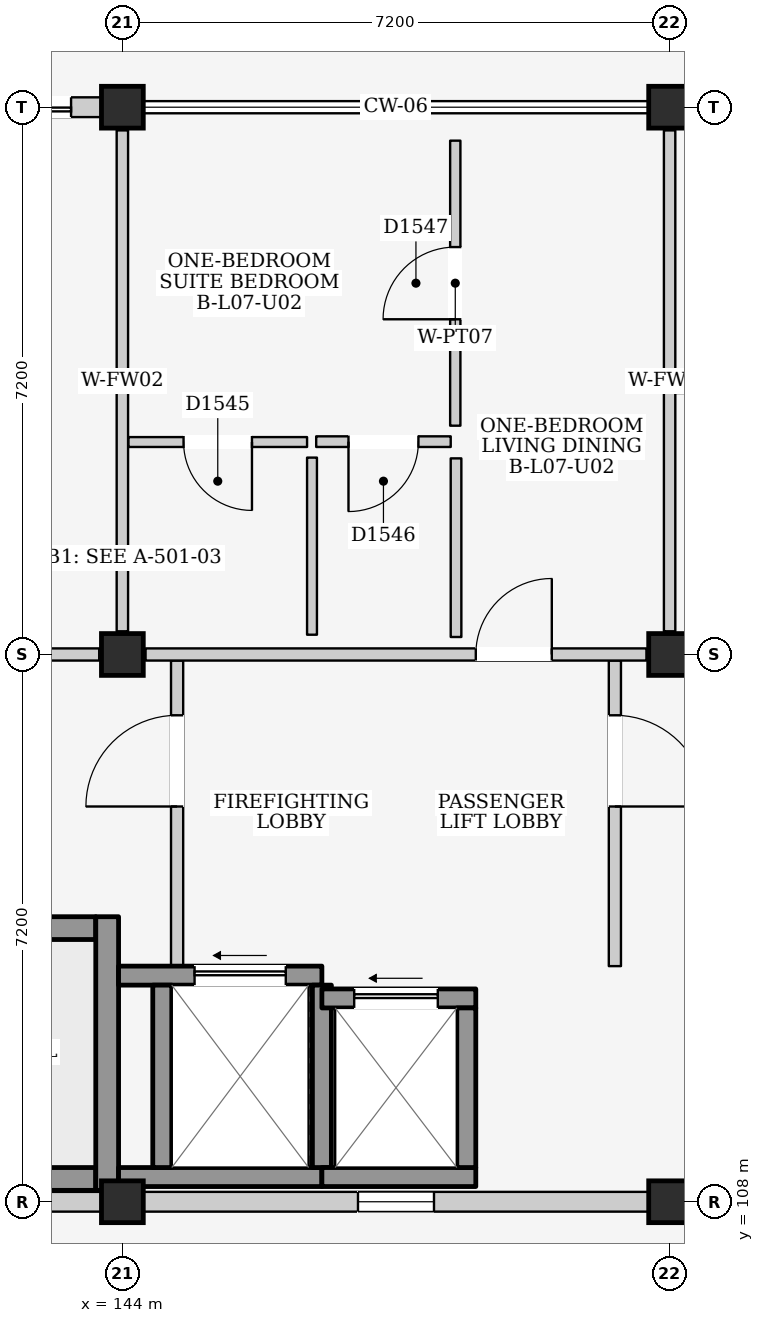
"""IFC4 building model, lengths in metres.
Left out: names, types, materials, properties, quantities, classifications, styles, units other than length and angle.
Written with IfcOpenShell. Run it as: python <this file> out.ifc"""

import sys

from ifc_helpers import new_model, si_unit, direction, frame, frame_2d, origin, origin_2d, place, context, subcontext, project, spatial, rectangle, extrude, element, fill, save


model = new_model("IFC4")
c1 = context("Model", 3, precision=1e-05, world=origin(), true_north=direction((0.0, 1.0)))
c2 = subcontext(c1, "Body", "Model", "MODEL_VIEW")
j1 = project(units=[si_unit("LENGTHUNIT", "METRE"), si_unit("PLANEANGLEUNIT", "RADIAN")], contexts=[c1])
p1 = place(None, origin())
s1 = spatial("IfcSite", under=j1, at=p1, CompositionType="ELEMENT")
p2 = place(p1, origin())
s2 = spatial("IfcBuilding", under=s1, at=p2, CompositionType="ELEMENT")
p3 = place(p2, frame((0.0, 0.0, 25.1)))
s3 = spatial("IfcBuildingStorey", under=s2, at=p3, CompositionType="ELEMENT", Elevation=25.1)
for number, where, z_axis, x_axis in (
    (1, (144.0, 108.0, 0.0), (0.0, 0.0, 1.0), (1.0, 0.0, 0.0)),
    (2, (144.0, 115.2, 0.0), (0.0, 0.0, 1.0), (1.0, 0.0, 0.0)),
    (3, (144.0, 122.4, 0.0), (0.0, 0.0, 1.0), (1.0, 0.0, 0.0)),
    (4, (151.2, 108.0, 0.0), (0.0, 0.0, 1.0), (1.0, 0.0, 0.0)),
    (5, (151.2, 115.2, 0.0), (0.0, 0.0, 1.0), (1.0, 0.0, 0.0)),
    (6, (151.2, 122.4, 0.0), (0.0, 0.0, 1.0), (1.0, 0.0, 0.0)),
):
    element("IfcColumn", number, at=place(p3, frame(where, z_axis=z_axis, x_axis=x_axis)), inside=s3, PredefinedType="COLUMN", context=c2, shape_type="SweptSolid", body=[
        extrude(rectangle(XDim=0.55, YDim=0.55, at=origin_2d()), origin(), (0.0, 0.0, 1.0), 3.2),
    ])
p4 = place(p3, frame((137.075, 108.0, 0.0), z_axis=(0.0, 0.0, 1.0), x_axis=(1.0, 0.0, 0.0)))
e7 = element("IfcWall", 7, at=p4, inside=s3, PredefinedType="ELEMENTEDWALL", context=c2, shape_type="SweptSolid", body=[
    extrude(rectangle(XDim=6.65, YDim=0.26, at=frame_2d((3.325, 0.0))), origin(), (0.0, 0.0, 1.0), 2.375),
])
p5 = place(p4, frame((2.825, 0.0, 1.2)))
e8 = element("IfcOpeningElement", 8, at=p5, cuts=e7, PredefinedType="OPENING", context=c2, shape_type="SweptSolid", body=[
    extrude(rectangle(XDim=1.0, YDim=0.9, at=frame_2d((0.5, 0.45))), frame((0.0, 0.145, 0.0), z_axis=(0.0, -1.0, 0.0), x_axis=(1.0, 0.0, 0.0)), (0.0, 0.0, 1.0), 0.29),
])
p6 = place(p3, frame((137.075, 122.4, 0.0), z_axis=(0.0, 0.0, 1.0), x_axis=(1.0, 0.0, 0.0)))
e9 = element("IfcWall", 9, at=p6, inside=s3, PredefinedType="ELEMENTEDWALL", context=c2, shape_type="SweptSolid", body=[
    extrude(rectangle(XDim=6.65, YDim=0.26, at=frame_2d((3.325, 0.0))), origin(), (0.0, 0.0, 1.0), 2.525),
])
p7 = place(p6, frame((3.85, 0.0, 0.0)))
e10 = element("IfcOpeningElement", 10, at=p7, cuts=e9, PredefinedType="OPENING", context=c2, shape_type="SweptSolid", body=[
    extrude(rectangle(XDim=2.4, YDim=2.12, at=frame_2d((1.2, 1.06))), frame((0.0, 0.145, 0.0), z_axis=(0.0, -1.0, 0.0), x_axis=(1.0, 0.0, 0.0)), (0.0, 0.0, 1.0), 0.29),
])
p8 = place(p6, frame((0.55, 0.0, 0.9)))
e11 = element("IfcOpeningElement", 11, at=p8, cuts=e9, PredefinedType="OPENING", context=c2, shape_type="SweptSolid", body=[
    extrude(rectangle(XDim=1.7, YDim=1.45, at=frame_2d((0.85, 0.725))), frame((0.0, 0.145, 0.0), z_axis=(0.0, -1.0, 0.0), x_axis=(1.0, 0.0, 0.0)), (0.0, 0.0, 1.0), 0.29),
])
p9 = place(p3, frame((144.275, 108.0, 0.0), z_axis=(0.0, 0.0, 1.0), x_axis=(1.0, 0.0, 0.0)))
e12 = element("IfcWall", 12, at=p9, inside=s3, PredefinedType="ELEMENTEDWALL", context=c2, shape_type="SweptSolid", body=[
    extrude(rectangle(XDim=6.65, YDim=0.26, at=frame_2d((3.325, 0.0))), origin(), (0.0, 0.0, 1.0), 2.375),
])
p10 = place(p9, frame((2.825, 0.0, 1.2)))
e13 = element("IfcOpeningElement", 13, at=p10, cuts=e12, PredefinedType="OPENING", context=c2, shape_type="SweptSolid", body=[
    extrude(rectangle(XDim=1.0, YDim=0.9, at=frame_2d((0.5, 0.45))), frame((0.0, 0.145, 0.0), z_axis=(0.0, -1.0, 0.0), x_axis=(1.0, 0.0, 0.0)), (0.0, 0.0, 1.0), 0.29),
])
p11 = place(p3, frame((137.15, 108.3, 0.0), z_axis=(0.0, 0.0, 1.0), x_axis=(1.0, 0.0, 0.0)))
e14 = element("IfcWall", 14, at=p11, inside=s3, PredefinedType="SHEAR", context=c2, shape_type="SweptSolid", body=[
    extrude(rectangle(XDim=6.5, YDim=0.3, at=frame_2d((3.25, 0.0))), origin(), (0.0, 0.0, 1.0), 2.99),
])
p12 = place(p3, frame((137.15, 111.6, 0.0), z_axis=(0.0, 0.0, 1.0), x_axis=(1.0, 0.0, 0.0)))
e15 = element("IfcWall", 15, at=p12, inside=s3, PredefinedType="SHEAR", context=c2, shape_type="SweptSolid", body=[
    extrude(rectangle(XDim=6.5, YDim=0.3, at=frame_2d((3.25, 0.0))), origin(), (0.0, 0.0, 1.0), 2.99),
])
p13 = place(p12, frame((0.18, 0.0, 0.0)))
e16 = element("IfcOpeningElement", 16, at=p13, cuts=e15, PredefinedType="OPENING", context=c2, shape_type="SweptSolid", body=[
    extrude(rectangle(XDim=1.15, YDim=2.2, at=frame_2d((0.575, 1.1))), frame((0.0, 0.165, 0.0), z_axis=(0.0, -1.0, 0.0), x_axis=(1.0, 0.0, 0.0)), (0.0, 0.0, 1.0), 0.33),
])
p14 = place(p3, frame((143.8, 108.15, 0.0), z_axis=(0.0, 0.0, 1.0), x_axis=(0.0, 1.0, 0.0)))
e17 = element("IfcWall", 17, at=p14, inside=s3, PredefinedType="SHEAR", context=c2, shape_type="SweptSolid", body=[
    extrude(rectangle(XDim=3.6, YDim=0.3, at=frame_2d((1.8, 0.0))), origin(), (0.0, 0.0, 1.0), 2.99),
])
p15 = place(p3, frame((144.72, 111.1, 0.0), z_axis=(0.0, 0.0, 1.0), x_axis=(0.0, 1.0, 0.0)))
e18 = element("IfcWall", 18, at=p15, inside=s3, PredefinedType="PARTITIONING", context=c2, shape_type="SweptSolid", body=[
    extrude(rectangle(XDim=4.02, YDim=0.16, at=frame_2d((2.01, 0.0))), origin(), (0.0, 0.0, 1.0), 2.99),
])
p16 = place(p15, frame((2.1, 0.0, 0.0)))
e19 = element("IfcOpeningElement", 19, at=p16, cuts=e18, PredefinedType="OPENING", context=c2, shape_type="SweptSolid", body=[
    extrude(rectangle(XDim=1.2, YDim=2.2, at=frame_2d((0.6, 1.1))), frame((0.0, 0.095, 0.0), z_axis=(0.0, -1.0, 0.0), x_axis=(1.0, 0.0, 0.0)), (0.0, 0.0, 1.0), 0.19),
])
p17 = place(p3, frame((150.48, 111.1, 0.0), z_axis=(0.0, 0.0, 1.0), x_axis=(0.0, 1.0, 0.0)))
e20 = element("IfcWall", 20, at=p17, inside=s3, PredefinedType="PARTITIONING", context=c2, shape_type="SweptSolid", body=[
    extrude(rectangle(XDim=4.02, YDim=0.16, at=frame_2d((2.01, 0.0))), origin(), (0.0, 0.0, 1.0), 2.99),
])
p18 = place(p17, frame((2.1, 0.0, 0.0)))
e21 = element("IfcOpeningElement", 21, at=p18, cuts=e20, PredefinedType="OPENING", context=c2, shape_type="SweptSolid", body=[
    extrude(rectangle(XDim=1.2, YDim=2.2, at=frame_2d((0.6, 1.1))), frame((0.0, 0.095, 0.0), z_axis=(0.0, -1.0, 0.0), x_axis=(1.0, 0.0, 0.0)), (0.0, 0.0, 1.0), 0.19),
])
p19 = place(p3, frame((143.95, 108.325, 0.0), z_axis=(0.0, 0.0, 1.0), x_axis=(1.0, 0.0, 0.0)))
e22 = element("IfcWall", 22, at=p19, inside=s3, PredefinedType="SHEAR", context=c2, shape_type="SweptSolid", body=[
    extrude(rectangle(XDim=2.675, YDim=0.25, at=frame_2d((1.337, 0.0))), origin(), (0.0, 0.0, 1.0), 2.99),
])
p20 = place(p3, frame((143.95, 110.975, 0.0), z_axis=(0.0, 0.0, 1.0), x_axis=(1.0, 0.0, 0.0)))
e23 = element("IfcWall", 23, at=p20, inside=s3, PredefinedType="SHEAR", context=c2, shape_type="SweptSolid", body=[
    extrude(rectangle(XDim=2.675, YDim=0.25, at=frame_2d((1.337, 0.0))), origin(), (0.0, 0.0, 1.0), 2.99),
])
p21 = place(p20, frame((1.0, 0.0, 0.0)))
e24 = element("IfcOpeningElement", 24, at=p21, cuts=e23, PredefinedType="OPENING", context=c2, shape_type="SweptSolid", body=[
    extrude(rectangle(XDim=1.2, YDim=2.25, at=frame_2d((0.6, 1.125))), frame((0.0, 0.14, 0.0), z_axis=(0.0, -1.0, 0.0), x_axis=(1.0, 0.0, 0.0)), (0.0, 0.0, 1.0), 0.28),
])
for number, where, z_axis, x_axis in (
    (25, (144.525, 108.45, 0.0), (0.0, 0.0, 1.0), (0.0, 1.0, 0.0)),
    (26, (146.625, 108.45, 0.0), (0.0, 0.0, 1.0), (0.0, 1.0, 0.0)),
):
    element("IfcWall", number, at=place(p3, frame(where, z_axis=z_axis, x_axis=x_axis)), inside=s3, PredefinedType="SHEAR", context=c2, shape_type="SweptSolid", body=[
        extrude(rectangle(XDim=2.4, YDim=0.25, at=frame_2d((1.2, 0.0))), origin(), (0.0, 0.0, 1.0), 2.99),
    ])
p22 = place(p3, frame((146.625, 108.325, 0.0), z_axis=(0.0, 0.0, 1.0), x_axis=(1.0, 0.0, 0.0)))
e27 = element("IfcWall", 27, at=p22, inside=s3, PredefinedType="SHEAR", context=c2, shape_type="SweptSolid", body=[
    extrude(rectangle(XDim=2.025, YDim=0.25, at=frame_2d((1.012, 0.0))), origin(), (0.0, 0.0, 1.0), 2.99),
])
p23 = place(p3, frame((146.625, 110.675, 0.0), z_axis=(0.0, 0.0, 1.0), x_axis=(1.0, 0.0, 0.0)))
e28 = element("IfcWall", 28, at=p23, inside=s3, PredefinedType="SHEAR", context=c2, shape_type="SweptSolid", body=[
    extrude(rectangle(XDim=2.025, YDim=0.25, at=frame_2d((1.012, 0.0))), origin(), (0.0, 0.0, 1.0), 2.99),
])
p24 = place(p23, frame((0.425, 0.0, 0.0)))
e29 = element("IfcOpeningElement", 29, at=p24, cuts=e28, PredefinedType="OPENING", context=c2, shape_type="SweptSolid", body=[
    extrude(rectangle(XDim=1.1, YDim=2.15, at=frame_2d((0.55, 1.075))), frame((0.0, 0.14, 0.0), z_axis=(0.0, -1.0, 0.0), x_axis=(1.0, 0.0, 0.0)), (0.0, 0.0, 1.0), 0.28),
])
p25 = place(p3, frame((148.525, 108.45, 0.0), z_axis=(0.0, 0.0, 1.0), x_axis=(0.0, 1.0, 0.0)))
e30 = element("IfcWall", 30, at=p25, inside=s3, PredefinedType="SHEAR", context=c2, shape_type="SweptSolid", body=[
    extrude(rectangle(XDim=2.1, YDim=0.25, at=frame_2d((1.05, 0.0))), origin(), (0.0, 0.0, 1.0), 2.99),
])
p26 = place(p3, frame((137.105, 115.2, 0.0), z_axis=(0.0, 0.0, 1.0), x_axis=(1.0, 0.0, 0.0)))
e31 = element("IfcWall", 31, at=p26, inside=s3, PredefinedType="PARTITIONING", context=c2, shape_type="SweptSolid", body=[
    extrude(rectangle(XDim=6.59, YDim=0.16, at=frame_2d((3.295, 0.0))), origin(), (0.0, 0.0, 1.0), 2.375),
])
p27 = place(p3, frame((144.0, 115.505, 0.0), z_axis=(0.0, 0.0, 1.0), x_axis=(0.0, 1.0, 0.0)))
e32 = element("IfcWall", 32, at=p27, inside=s3, PredefinedType="PARTITIONING", context=c2, shape_type="SweptSolid", body=[
    extrude(rectangle(XDim=6.59, YDim=0.15, at=frame_2d((3.295, 0.0))), origin(), (0.0, 0.0, 1.0), 2.475),
])
p28 = place(p3, frame((144.305, 115.2, 0.0), z_axis=(0.0, 0.0, 1.0), x_axis=(1.0, 0.0, 0.0)))
e33 = element("IfcWall", 33, at=p28, inside=s3, PredefinedType="PARTITIONING", context=c2, shape_type="SweptSolid", body=[
    extrude(rectangle(XDim=6.59, YDim=0.16, at=frame_2d((3.295, 0.0))), origin(), (0.0, 0.0, 1.0), 2.375),
])
p29 = place(p28, frame((4.345, 0.0, 0.0)))
e34 = element("IfcOpeningElement", 34, at=p29, cuts=e33, PredefinedType="OPENING", context=c2, shape_type="SweptSolid", body=[
    extrude(rectangle(XDim=1.0, YDim=2.15, at=frame_2d((0.5, 1.075))), frame((0.0, 0.095, 0.0), z_axis=(0.0, -1.0, 0.0), x_axis=(1.0, 0.0, 0.0)), (0.0, 0.0, 1.0), 0.19),
])
p30 = place(p3, frame((151.2, 115.505, 0.0), z_axis=(0.0, 0.0, 1.0), x_axis=(0.0, 1.0, 0.0)))
e35 = element("IfcWall", 35, at=p30, inside=s3, PredefinedType="PARTITIONING", context=c2, shape_type="SweptSolid", body=[
    extrude(rectangle(XDim=6.59, YDim=0.15, at=frame_2d((3.295, 0.0))), origin(), (0.0, 0.0, 1.0), 2.475),
])
p31 = place(p3, frame((144.08, 117.995, 0.0), z_axis=(0.0, 0.0, 1.0), x_axis=(1.0, 0.0, 0.0)))
e36 = element("IfcWall", 36, at=p31, inside=s3, PredefinedType="PARTITIONING", context=c2, shape_type="SweptSolid", body=[
    extrude(rectangle(XDim=2.35, YDim=0.13, at=frame_2d((1.175, 0.0))), origin(), (0.0, 0.0, 1.0), 2.99),
])
p32 = place(p31, frame((0.725, 0.0, 0.0)))
e37 = element("IfcOpeningElement", 37, at=p32, cuts=e36, PredefinedType="OPENING", context=c2, shape_type="SweptSolid", body=[
    extrude(rectangle(XDim=0.9, YDim=2.1, at=frame_2d((0.45, 1.05))), frame((0.0, 0.08, 0.0), z_axis=(0.0, -1.0, 0.0), x_axis=(1.0, 0.0, 0.0)), (0.0, 0.0, 1.0), 0.16),
])
p33 = place(p3, frame((146.495, 115.46, 0.0), z_axis=(0.0, 0.0, 1.0), x_axis=(0.0, 1.0, 0.0)))
e38 = element("IfcWall", 38, at=p33, inside=s3, PredefinedType="PARTITIONING", context=c2, shape_type="SweptSolid", body=[
    extrude(rectangle(XDim=2.33, YDim=0.13, at=frame_2d((1.165, 0.0))), origin(), (0.0, 0.0, 1.0), 2.99),
])
p34 = place(p3, frame((146.55, 118.0, 0.0), z_axis=(0.0, 0.0, 1.0), x_axis=(1.0, 0.0, 0.0)))
e39 = element("IfcWall", 39, at=p34, inside=s3, PredefinedType="PARTITIONING", context=c2, shape_type="SweptSolid", body=[
    extrude(rectangle(XDim=1.77, YDim=0.14, at=frame_2d((0.885, 0.0))), origin(), (0.0, 0.0, 1.0), 2.99),
])
p35 = place(p34, frame((0.425, 0.0, 0.0)))
e40 = element("IfcOpeningElement", 40, at=p35, cuts=e39, PredefinedType="OPENING", context=c2, shape_type="SweptSolid", body=[
    extrude(rectangle(XDim=0.92, YDim=2.1, at=frame_2d((0.46, 1.05))), frame((0.0, 0.085, 0.0), z_axis=(0.0, -1.0, 0.0), x_axis=(1.0, 0.0, 0.0)), (0.0, 0.0, 1.0), 0.17),
])
p36 = place(p3, frame((148.39, 115.43, 0.0), z_axis=(0.0, 0.0, 1.0), x_axis=(0.0, 1.0, 0.0)))
e41 = element("IfcWall", 41, at=p36, inside=s3, PredefinedType="PARTITIONING", context=c2, shape_type="SweptSolid", body=[
    extrude(rectangle(XDim=2.35, YDim=0.14, at=frame_2d((1.175, 0.0))), origin(), (0.0, 0.0, 1.0), 2.99),
])
p37 = place(p3, frame((148.38, 118.21, 0.0), z_axis=(0.0, 0.0, 1.0), x_axis=(0.0, 1.0, 0.0)))
e42 = element("IfcWall", 42, at=p37, inside=s3, PredefinedType="PARTITIONING", context=c2, shape_type="SweptSolid", body=[
    extrude(rectangle(XDim=3.75, YDim=0.135, at=frame_2d((1.875, 0.0))), origin(), (0.0, 0.0, 1.0), 2.99),
])
p38 = place(p37, frame((1.4, 0.0, 0.0)))
e43 = element("IfcOpeningElement", 43, at=p38, cuts=e42, PredefinedType="OPENING", context=c2, shape_type="SweptSolid", body=[
    extrude(rectangle(XDim=0.95, YDim=2.15, at=frame_2d((0.475, 1.075))), frame((0.0, 0.083, 0.0), z_axis=(0.0, -1.0, 0.0), x_axis=(1.0, 0.0, 0.0)), (0.0, 0.0, 1.0), 0.165),
])
p39 = place(p3, frame((151.28, 118.705, 0.0), z_axis=(0.0, 0.0, 1.0), x_axis=(1.0, 0.0, 0.0)))
e44 = element("IfcWall", 44, at=p39, inside=s3, PredefinedType="PARTITIONING", context=c2, shape_type="SweptSolid", body=[
    extrude(rectangle(XDim=2.4, YDim=0.13, at=frame_2d((1.2, 0.0))), origin(), (0.0, 0.0, 1.0), 2.99),
])
p40 = place(p39, frame((0.75, 0.0, 0.0)))
e45 = element("IfcOpeningElement", 45, at=p40, cuts=e44, PredefinedType="OPENING", context=c2, shape_type="SweptSolid", body=[
    extrude(rectangle(XDim=0.9, YDim=2.1, at=frame_2d((0.45, 1.05))), frame((0.0, 0.08, 0.0), z_axis=(0.0, -1.0, 0.0), x_axis=(1.0, 0.0, 0.0)), (0.0, 0.0, 1.0), 0.16),
])
p41 = place(p7, frame((2.4, 0.0, 0.0), z_axis=(0.0, 0.0, 1.0), x_axis=(-1.0, 0.0, 0.0)))
e46 = element("IfcDoor", 46, at=p41, inside=s3, OperationType="DOUBLE_DOOR_SLIDING", PredefinedType="DOOR", context=c2, shape_type="SweptSolid", body=[
    extrude(rectangle(XDim=2.4, YDim=2.12, at=frame_2d((1.2, 1.06))), frame((0.0, 0.025, 0.0), z_axis=(0.0, -1.0, 0.0), x_axis=(1.0, 0.0, 0.0)), (0.0, 0.0, 1.0), 0.05),
])
fill(e10, e46)
p42 = place(p10, origin())
e47 = element("IfcWindow", 47, at=p42, inside=s3, PartitioningType="SINGLE_PANEL", PredefinedType="WINDOW", context=c2, shape_type="SweptSolid", body=[
    extrude(rectangle(XDim=1.0, YDim=0.9, at=frame_2d((0.5, 0.45))), frame((0.0, 0.03, 0.0), z_axis=(0.0, -1.0, 0.0), x_axis=(1.0, 0.0, 0.0)), (0.0, 0.0, 1.0), 0.06),
])
fill(e13, e47)
p43 = place(p16, origin())
e48 = element("IfcDoor", 48, at=p43, inside=s3, OperationType="SINGLE_SWING_LEFT", PredefinedType="DOOR", context=c2, shape_type="SweptSolid", body=[
    extrude(rectangle(XDim=1.2, YDim=2.2, at=frame_2d((0.6, 1.1))), frame((0.0, 0.025, 0.0), z_axis=(0.0, -1.0, 0.0), x_axis=(1.0, 0.0, 0.0)), (0.0, 0.0, 1.0), 0.05),
])
fill(e19, e48)
p44 = place(p18, frame((1.2, 0.0, 0.0), z_axis=(0.0, 0.0, 1.0), x_axis=(-1.0, 0.0, 0.0)))
e49 = element("IfcDoor", 49, at=p44, inside=s3, OperationType="SINGLE_SWING_RIGHT", PredefinedType="DOOR", context=c2, shape_type="SweptSolid", body=[
    extrude(rectangle(XDim=1.2, YDim=2.2, at=frame_2d((0.6, 1.1))), frame((0.0, 0.025, 0.0), z_axis=(0.0, -1.0, 0.0), x_axis=(1.0, 0.0, 0.0)), (0.0, 0.0, 1.0), 0.05),
])
fill(e21, e49)
p45 = place(p21, origin())
e50 = element("IfcDoor", 50, at=p45, inside=s3, OperationType="SLIDING_TO_LEFT", PredefinedType="DOOR", context=c2, shape_type="SweptSolid", body=[
    extrude(rectangle(XDim=1.2, YDim=2.25, at=frame_2d((0.6, 1.125))), frame((0.0, 0.025, 0.0), z_axis=(0.0, -1.0, 0.0), x_axis=(1.0, 0.0, 0.0)), (0.0, 0.0, 1.0), 0.05),
])
fill(e24, e50)
p46 = place(p24, origin())
e51 = element("IfcDoor", 51, at=p46, inside=s3, OperationType="SLIDING_TO_LEFT", PredefinedType="DOOR", context=c2, shape_type="SweptSolid", body=[
    extrude(rectangle(XDim=1.1, YDim=2.15, at=frame_2d((0.55, 1.075))), frame((0.0, 0.025, 0.0), z_axis=(0.0, -1.0, 0.0), x_axis=(1.0, 0.0, 0.0)), (0.0, 0.0, 1.0), 0.05),
])
fill(e29, e51)
p47 = place(p29, origin())
e52 = element("IfcDoor", 52, at=p47, inside=s3, OperationType="SINGLE_SWING_RIGHT", PredefinedType="DOOR", context=c2, shape_type="SweptSolid", body=[
    extrude(rectangle(XDim=1.0, YDim=2.15, at=frame_2d((0.5, 1.075))), frame((0.0, 0.025, 0.0), z_axis=(0.0, -1.0, 0.0), x_axis=(1.0, 0.0, 0.0)), (0.0, 0.0, 1.0), 0.05),
])
fill(e34, e52)
p48 = place(p32, frame((0.9, 0.0, 0.0), z_axis=(0.0, 0.0, 1.0), x_axis=(-1.0, 0.0, 0.0)))
e53 = element("IfcDoor", 53, at=p48, inside=s3, OperationType="SINGLE_SWING_LEFT", PredefinedType="DOOR", context=c2, shape_type="SweptSolid", body=[
    extrude(rectangle(XDim=0.9, YDim=2.1, at=frame_2d((0.45, 1.05))), frame((0.0, 0.025, 0.0), z_axis=(0.0, -1.0, 0.0), x_axis=(1.0, 0.0, 0.0)), (0.0, 0.0, 1.0), 0.05),
])
fill(e37, e53)
p49 = place(p35, frame((0.92, 0.0, 0.0), z_axis=(0.0, 0.0, 1.0), x_axis=(-1.0, 0.0, 0.0)))
e54 = element("IfcDoor", 54, at=p49, inside=s3, OperationType="SINGLE_SWING_RIGHT", PredefinedType="DOOR", context=c2, shape_type="SweptSolid", body=[
    extrude(rectangle(XDim=0.92, YDim=2.1, at=frame_2d((0.46, 1.05))), frame((0.0, 0.025, 0.0), z_axis=(0.0, -1.0, 0.0), x_axis=(1.0, 0.0, 0.0)), (0.0, 0.0, 1.0), 0.05),
])
fill(e40, e54)
p50 = place(p38, origin())
e55 = element("IfcDoor", 55, at=p50, inside=s3, OperationType="SINGLE_SWING_LEFT", PredefinedType="DOOR", context=c2, shape_type="SweptSolid", body=[
    extrude(rectangle(XDim=0.95, YDim=2.15, at=frame_2d((0.475, 1.075))), frame((0.0, 0.025, 0.0), z_axis=(0.0, -1.0, 0.0), x_axis=(1.0, 0.0, 0.0)), (0.0, 0.0, 1.0), 0.05),
])
fill(e43, e55)
save(model, sys.argv[1])
